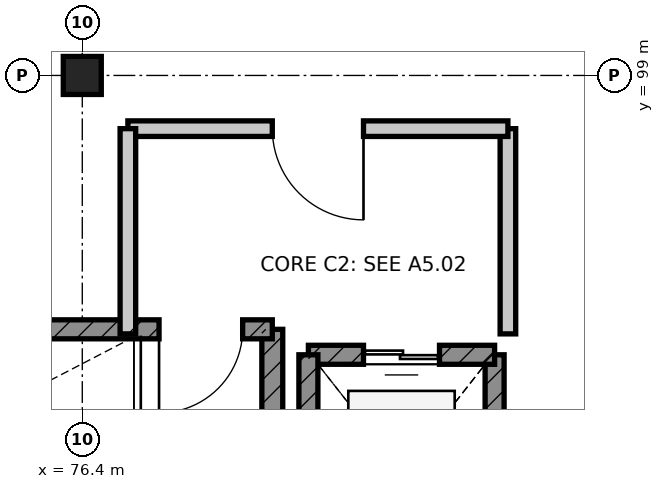
"""IFC4 building model, lengths in metres.
Left out: names, types, materials, properties, quantities, classifications, styles, units other than length and angle.
Written with IfcOpenShell. Run it as: python <this file> out.ifc"""

import sys

from ifc_helpers import new_model, si_unit, direction, frame, frame_2d, origin, origin_2d, place, context, subcontext, project, spatial, rectangle, extrude, element, fill, save


model = new_model("IFC4")
c1 = context("Model", 3, precision=1e-05, world=origin(), true_north=direction((0.0, 1.0)))
c2 = subcontext(c1, "Body", "Model", "MODEL_VIEW")
j1 = project(units=[si_unit("LENGTHUNIT", "METRE"), si_unit("PLANEANGLEUNIT", "RADIAN")], contexts=[c1])
p1 = place(None, origin())
s1 = spatial("IfcSite", under=j1, at=p1, CompositionType="ELEMENT")
p2 = place(p1, origin())
s2 = spatial("IfcBuilding", under=s1, at=p2, CompositionType="ELEMENT")
p3 = place(p2, frame((0.0, 0.0, 44.4)))
s3 = spatial("IfcBuildingStorey", under=s2, at=p3, CompositionType="ELEMENT", Elevation=44.4)
p4 = place(p3, frame((76.4, 99.0, 0.0), z_axis=(0.0, 0.0, 1.0), x_axis=(1.0, 0.0, 0.0)))
e1 = element("IfcColumn", 1, at=p4, inside=s3, PredefinedType="COLUMN", context=c2, shape_type="SweptSolid", body=[
    extrude(rectangle(XDim=0.5, YDim=0.5, at=origin_2d()), origin(), (0.0, 0.0, 1.0), 4.2),
])
p5 = place(p3, frame((78.9, 92.1, 0.0), z_axis=(0.0, 0.0, 1.0), x_axis=(0.0, 1.0, 0.0)))
e2 = element("IfcWall", 2, at=p5, inside=s3, PredefinedType="SHEAR", context=c2, shape_type="SweptSolid", body=[
    extrude(rectangle(XDim=3.56, YDim=0.275, at=frame_2d((1.78, 0.0))), origin(), (0.0, 0.0, 1.0), 3.95),
])
p6 = place(p3, frame((78.9, 95.66, 0.0), z_axis=(0.0, 0.0, 1.0), x_axis=(-1.0, 0.0, 0.0)))
e3 = element("IfcWall", 3, at=p6, inside=s3, PredefinedType="SHEAR", context=c2, shape_type="SweptSolid", body=[
    extrude(rectangle(XDim=8.4, YDim=0.25, at=frame_2d((4.2, 0.0))), origin(), (0.0, 0.0, 1.0), 3.95),
])
p7 = place(p6, frame((0.39, 0.0, 0.0)))
e4 = element("IfcOpeningElement", 4, at=p7, cuts=e3, PredefinedType="OPENING", context=c2, shape_type="SweptSolid", body=[
    extrude(rectangle(XDim=1.1, YDim=2.1, at=frame_2d((0.55, 1.05))), frame((0.0, 0.135, 0.0), z_axis=(0.0, -1.0, 0.0), x_axis=(1.0, 0.0, 0.0)), (0.0, 0.0, 1.0), 0.27),
])
p8 = place(p3, frame((81.825, 92.275, 0.0), z_axis=(0.0, 0.0, 1.0), x_axis=(0.0, 1.0, 0.0)))
e5 = element("IfcWall", 5, at=p8, inside=s3, PredefinedType="SHEAR", context=c2, shape_type="SweptSolid", body=[
    extrude(rectangle(XDim=3.05, YDim=0.25, at=frame_2d((1.525, 0.0))), origin(), (0.0, 0.0, 1.0), 3.95),
])
p9 = place(p3, frame((81.825, 95.325, 0.0), z_axis=(0.0, 0.0, 1.0), x_axis=(-1.0, 0.0, 0.0)))
e6 = element("IfcWall", 6, at=p9, inside=s3, PredefinedType="SHEAR", context=c2, shape_type="SweptSolid", body=[
    extrude(rectangle(XDim=2.45, YDim=0.25, at=frame_2d((1.225, 0.0))), origin(), (0.0, 0.0, 1.0), 3.95),
])
p10 = place(p9, frame((0.725, 0.0, 0.0)))
e7 = element("IfcOpeningElement", 7, at=p10, cuts=e6, PredefinedType="OPENING", context=c2, shape_type="SweptSolid", body=[
    extrude(rectangle(XDim=1.0, YDim=2.15, at=frame_2d((0.5, 1.075))), frame((0.0, 0.135, 0.0), z_axis=(0.0, -1.0, 0.0), x_axis=(1.0, 0.0, 0.0)), (0.0, 0.0, 1.0), 0.27),
])
p11 = place(p3, frame((79.375, 95.325, 0.0), z_axis=(0.0, 0.0, 1.0), x_axis=(0.0, -1.0, 0.0)))
e8 = element("IfcWall", 8, at=p11, inside=s3, PredefinedType="SHEAR", context=c2, shape_type="SweptSolid", body=[
    extrude(rectangle(XDim=3.05, YDim=0.25, at=frame_2d((1.525, 0.0))), origin(), (0.0, 0.0, 1.0), 3.95),
])
p12 = place(p3, frame((82.0, 95.6, 0.0), z_axis=(0.0, 0.0, 1.0), x_axis=(0.0, 1.0, 0.0)))
e9 = element("IfcWall", 9, at=p12, inside=s3, PredefinedType="PARTITIONING", context=c2, shape_type="SweptSolid", body=[
    extrude(rectangle(XDim=2.7, YDim=0.205, at=frame_2d((1.35, 0.0))), origin(), (0.0, 0.0, 1.0), 3.95),
])
p13 = place(p3, frame((82.0, 98.3, 0.0), z_axis=(0.0, 0.0, 1.0), x_axis=(-1.0, 0.0, 0.0)))
e10 = element("IfcWall", 10, at=p13, inside=s3, PredefinedType="PARTITIONING", context=c2, shape_type="SweptSolid", body=[
    extrude(rectangle(XDim=5.0, YDim=0.205, at=frame_2d((2.5, 0.0))), origin(), (0.0, 0.0, 1.0), 3.95),
])
p14 = place(p13, frame((1.9, 0.0, 0.0)))
e11 = element("IfcOpeningElement", 11, at=p14, cuts=e10, PredefinedType="OPENING", context=c2, shape_type="SweptSolid", body=[
    extrude(rectangle(XDim=1.2, YDim=2.1, at=frame_2d((0.6, 1.05))), frame((0.0, 0.113, 0.0), z_axis=(0.0, -1.0, 0.0), x_axis=(1.0, 0.0, 0.0)), (0.0, 0.0, 1.0), 0.225),
])
p15 = place(p3, frame((77.0, 98.3, 0.0), z_axis=(0.0, 0.0, 1.0), x_axis=(0.0, -1.0, 0.0)))
e12 = element("IfcWall", 12, at=p15, inside=s3, PredefinedType="PARTITIONING", context=c2, shape_type="SweptSolid", body=[
    extrude(rectangle(XDim=2.7, YDim=0.205, at=frame_2d((1.35, 0.0))), origin(), (0.0, 0.0, 1.0), 3.95),
])
p16 = place(p7, origin())
e13 = element("IfcDoor", 13, at=p16, inside=s3, OperationType="SINGLE_SWING_RIGHT", PredefinedType="DOOR", context=c2, shape_type="SweptSolid", body=[
    extrude(rectangle(XDim=1.1, YDim=2.1, at=frame_2d((0.55, 1.05))), frame((0.0, 0.025, 0.0), z_axis=(0.0, -1.0, 0.0), x_axis=(1.0, 0.0, 0.0)), (0.0, 0.0, 1.0), 0.05),
])
fill(e4, e13)
p17 = place(p10, origin())
e14 = element("IfcDoor", 14, at=p17, inside=s3, OperationType="DOUBLE_DOOR_SLIDING", PredefinedType="DOOR", context=c2, shape_type="SweptSolid", body=[
    extrude(rectangle(XDim=1.0, YDim=2.15, at=frame_2d((0.5, 1.075))), frame((0.0, 0.025, 0.0), z_axis=(0.0, -1.0, 0.0), x_axis=(1.0, 0.0, 0.0)), (0.0, 0.0, 1.0), 0.05),
])
fill(e7, e14)
p18 = place(p14, origin())
e15 = element("IfcDoor", 15, at=p18, inside=s3, OperationType="SINGLE_SWING_LEFT", PredefinedType="DOOR", context=c2, shape_type="SweptSolid", body=[
    extrude(rectangle(XDim=1.2, YDim=2.1, at=frame_2d((0.6, 1.05))), frame((0.0, 0.025, 0.0), z_axis=(0.0, -1.0, 0.0), x_axis=(1.0, 0.0, 0.0)), (0.0, 0.0, 1.0), 0.05),
])
fill(e11, e15)
save(model, sys.argv[1])
